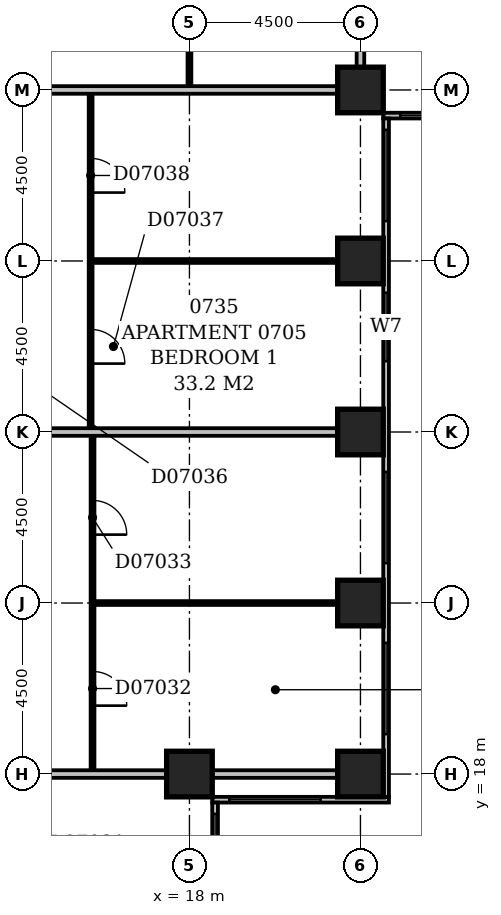
"""IFC4 building model, lengths in metres.
Left out: names, types, materials, properties, quantities, classifications, styles, units other than length and angle.
Written with IfcOpenShell. Run it as: python <this file> out.ifc"""

import sys

from ifc_helpers import new_model, si_unit, direction, frame, frame_2d, origin, origin_2d, place, context, subcontext, project, spatial, rectangle, extrude, element, fill, save


model = new_model("IFC4")
c1 = context("Model", 3, precision=1e-05, world=origin(), true_north=direction((0.0, 1.0)))
c2 = subcontext(c1, "Body", "Model", "MODEL_VIEW")
j1 = project(units=[si_unit("LENGTHUNIT", "METRE"), si_unit("PLANEANGLEUNIT", "RADIAN")], contexts=[c1])
p1 = place(None, origin())
s1 = spatial("IfcSite", under=j1, at=p1, CompositionType="ELEMENT")
p2 = place(p1, origin())
s2 = spatial("IfcBuilding", under=s1, at=p2, CompositionType="ELEMENT")
p3 = place(p2, frame((0.0, 0.0, 36.2)))
s3 = spatial("IfcBuildingStorey", under=s2, at=p3, CompositionType="ELEMENT", Elevation=36.2)
for number, where, z_axis, x_axis in (
    (1, (18.0, 18.0, -0.3), (0.0, 0.0, 1.0), (1.0, 0.0, 0.0)),
    (2, (22.5, 18.0, -0.3), (0.0, 0.0, 1.0), (1.0, 0.0, 0.0)),
    (3, (22.5, 22.5, -0.3), (0.0, 0.0, 1.0), (1.0, 0.0, 0.0)),
    (4, (22.5, 27.0, -0.3), (0.0, 0.0, 1.0), (1.0, 0.0, 0.0)),
    (5, (22.5, 31.5, -0.3), (0.0, 0.0, 1.0), (1.0, 0.0, 0.0)),
    (6, (22.5, 36.0, -0.3), (0.0, 0.0, 1.0), (1.0, 0.0, 0.0)),
):
    element("IfcColumn", number, at=place(p3, frame(where, z_axis=z_axis, x_axis=x_axis)), inside=s3, PredefinedType="COLUMN", context=c2, shape_type="SweptSolid", body=[
        extrude(rectangle(XDim=1.2, YDim=1.2, at=origin_2d()), origin(), (0.0, 0.0, 1.0), 3.6),
    ])
p4 = place(p3, frame((18.675, 8.4, 0.0), z_axis=(0.0, 0.0, 1.0), x_axis=(0.0, 1.0, 0.0)))
e7 = element("IfcWall", 7, at=p4, inside=s3, PredefinedType="STANDARD", context=c2, shape_type="SweptSolid", body=[
    extrude(rectangle(XDim=8.85, YDim=0.15, at=frame_2d((4.425, 0.0))), origin(), (0.0, 0.0, 1.0), 2.7),
])
p5 = place(p4, frame((1.65, 0.0, 0.6)))
e8 = element("IfcOpeningElement", 8, at=p5, cuts=e7, PredefinedType="OPENING", context=c2, shape_type="SweptSolid", body=[
    extrude(rectangle(XDim=2.4, YDim=1.8, at=frame_2d((1.2, 0.9))), frame((0.0, 0.087, 0.0), z_axis=(0.0, -1.0, 0.0), x_axis=(1.0, 0.0, 0.0)), (0.0, 0.0, 1.0), 0.174),
])
p6 = place(p4, frame((6.15, 0.0, 0.6)))
e9 = element("IfcOpeningElement", 9, at=p6, cuts=e7, PredefinedType="OPENING", context=c2, shape_type="SweptSolid", body=[
    extrude(rectangle(XDim=2.4, YDim=1.8, at=frame_2d((1.2, 0.9))), frame((0.0, 0.087, 0.0), z_axis=(0.0, -1.0, 0.0), x_axis=(1.0, 0.0, 0.0)), (0.0, 0.0, 1.0), 0.174),
])
p7 = place(p3, frame((18.6, 17.325, 0.0), z_axis=(0.0, 0.0, 1.0), x_axis=(1.0, 0.0, 0.0)))
e10 = element("IfcWall", 10, at=p7, inside=s3, PredefinedType="STANDARD", context=c2, shape_type="SweptSolid", body=[
    extrude(rectangle(XDim=4.65, YDim=0.15, at=frame_2d((2.325, 0.0))), origin(), (0.0, 0.0, 1.0), 2.7),
])
p8 = place(p7, frame((0.45, 0.0, 0.6)))
e11 = element("IfcOpeningElement", 11, at=p8, cuts=e10, PredefinedType="OPENING", context=c2, shape_type="SweptSolid", body=[
    extrude(rectangle(XDim=2.4, YDim=1.8, at=frame_2d((1.2, 0.9))), frame((0.0, 0.087, 0.0), z_axis=(0.0, -1.0, 0.0), x_axis=(1.0, 0.0, 0.0)), (0.0, 0.0, 1.0), 0.174),
])
p9 = place(p3, frame((23.175, 17.4, 0.0), z_axis=(0.0, 0.0, 1.0), x_axis=(0.0, 1.0, 0.0)))
e12 = element("IfcWall", 12, at=p9, inside=s3, PredefinedType="STANDARD", context=c2, shape_type="SweptSolid", body=[
    extrude(rectangle(XDim=17.85, YDim=0.15, at=frame_2d((8.925, 0.0))), origin(), (0.0, 0.0, 1.0), 2.7),
])
p10 = place(p9, frame((1.65, 0.0, 0.6)))
e13 = element("IfcOpeningElement", 13, at=p10, cuts=e12, PredefinedType="OPENING", context=c2, shape_type="SweptSolid", body=[
    extrude(rectangle(XDim=2.4, YDim=1.8, at=frame_2d((1.2, 0.9))), frame((0.0, 0.087, 0.0), z_axis=(0.0, -1.0, 0.0), x_axis=(1.0, 0.0, 0.0)), (0.0, 0.0, 1.0), 0.174),
])
p11 = place(p9, frame((6.15, 0.0, 0.6)))
e14 = element("IfcOpeningElement", 14, at=p11, cuts=e12, PredefinedType="OPENING", context=c2, shape_type="SweptSolid", body=[
    extrude(rectangle(XDim=2.4, YDim=1.8, at=frame_2d((1.2, 0.9))), frame((0.0, 0.087, 0.0), z_axis=(0.0, -1.0, 0.0), x_axis=(1.0, 0.0, 0.0)), (0.0, 0.0, 1.0), 0.174),
])
p12 = place(p9, frame((11.465, 0.0, 0.6)))
e15 = element("IfcOpeningElement", 15, at=p12, cuts=e12, PredefinedType="OPENING", context=c2, shape_type="SweptSolid", body=[
    extrude(rectangle(XDim=1.8, YDim=1.8, at=frame_2d((0.9, 0.9))), frame((0.0, 0.087, 0.0), z_axis=(0.0, -1.0, 0.0), x_axis=(1.0, 0.0, 0.0)), (0.0, 0.0, 1.0), 0.174),
])
p13 = place(p9, frame((15.15, 0.0, 0.6)))
e16 = element("IfcOpeningElement", 16, at=p13, cuts=e12, PredefinedType="OPENING", context=c2, shape_type="SweptSolid", body=[
    extrude(rectangle(XDim=2.4, YDim=1.8, at=frame_2d((1.2, 0.9))), frame((0.0, 0.087, 0.0), z_axis=(0.0, -1.0, 0.0), x_axis=(1.0, 0.0, 0.0)), (0.0, 0.0, 1.0), 0.174),
])
p14 = place(p3, frame((23.1, 35.325, 0.0), z_axis=(0.0, 0.0, 1.0), x_axis=(1.0, 0.0, 0.0)))
e17 = element("IfcWall", 17, at=p14, inside=s3, PredefinedType="STANDARD", context=c2, shape_type="SweptSolid", body=[
    extrude(rectangle(XDim=45.15, YDim=0.15, at=frame_2d((22.575, 0.0))), origin(), (0.0, 0.0, 1.0), 2.7),
])
p15 = place(p14, frame((0.45, 0.0, 0.6)))
e18 = element("IfcOpeningElement", 18, at=p15, cuts=e17, PredefinedType="OPENING", context=c2, shape_type="SweptSolid", body=[
    extrude(rectangle(XDim=2.4, YDim=1.8, at=frame_2d((1.2, 0.9))), frame((0.0, 0.087, 0.0), z_axis=(0.0, -1.0, 0.0), x_axis=(1.0, 0.0, 0.0)), (0.0, 0.0, 1.0), 0.174),
])
p16 = place(p14, frame((4.776, 0.0, 0.6)))
e19 = element("IfcOpeningElement", 19, at=p16, cuts=e17, PredefinedType="OPENING", context=c2, shape_type="SweptSolid", body=[
    extrude(rectangle(XDim=1.8, YDim=1.8, at=frame_2d((0.9, 0.9))), frame((0.0, 0.087, 0.0), z_axis=(0.0, -1.0, 0.0), x_axis=(1.0, 0.0, 0.0)), (0.0, 0.0, 1.0), 0.174),
])
p17 = place(p14, frame((9.45, 0.0, 0.6)))
e20 = element("IfcOpeningElement", 20, at=p17, cuts=e17, PredefinedType="OPENING", context=c2, shape_type="SweptSolid", body=[
    extrude(rectangle(XDim=2.4, YDim=1.8, at=frame_2d((1.2, 0.9))), frame((0.0, 0.087, 0.0), z_axis=(0.0, -1.0, 0.0), x_axis=(1.0, 0.0, 0.0)), (0.0, 0.0, 1.0), 0.174),
])
p18 = place(p14, frame((13.95, 0.0, 0.6)))
e21 = element("IfcOpeningElement", 21, at=p18, cuts=e17, PredefinedType="OPENING", context=c2, shape_type="SweptSolid", body=[
    extrude(rectangle(XDim=2.4, YDim=1.8, at=frame_2d((1.2, 0.9))), frame((0.0, 0.087, 0.0), z_axis=(0.0, -1.0, 0.0), x_axis=(1.0, 0.0, 0.0)), (0.0, 0.0, 1.0), 0.174),
])
p19 = place(p14, frame((19.777, 0.0, 0.6)))
e22 = element("IfcOpeningElement", 22, at=p19, cuts=e17, PredefinedType="OPENING", context=c2, shape_type="SweptSolid", body=[
    extrude(rectangle(XDim=1.2, YDim=1.8, at=frame_2d((0.6, 0.9))), frame((0.0, 0.087, 0.0), z_axis=(0.0, -1.0, 0.0), x_axis=(1.0, 0.0, 0.0)), (0.0, 0.0, 1.0), 0.174),
])
p20 = place(p14, frame((22.95, 0.0, 0.6)))
e23 = element("IfcOpeningElement", 23, at=p20, cuts=e17, PredefinedType="OPENING", context=c2, shape_type="SweptSolid", body=[
    extrude(rectangle(XDim=2.4, YDim=1.8, at=frame_2d((1.2, 0.9))), frame((0.0, 0.087, 0.0), z_axis=(0.0, -1.0, 0.0), x_axis=(1.0, 0.0, 0.0)), (0.0, 0.0, 1.0), 0.174),
])
p21 = place(p14, frame((27.45, 0.0, 0.6)))
e24 = element("IfcOpeningElement", 24, at=p21, cuts=e17, PredefinedType="OPENING", context=c2, shape_type="SweptSolid", body=[
    extrude(rectangle(XDim=2.4, YDim=1.8, at=frame_2d((1.2, 0.9))), frame((0.0, 0.087, 0.0), z_axis=(0.0, -1.0, 0.0), x_axis=(1.0, 0.0, 0.0)), (0.0, 0.0, 1.0), 0.174),
])
p22 = place(p14, frame((31.95, 0.0, 0.6)))
e25 = element("IfcOpeningElement", 25, at=p22, cuts=e17, PredefinedType="OPENING", context=c2, shape_type="SweptSolid", body=[
    extrude(rectangle(XDim=2.4, YDim=1.8, at=frame_2d((1.2, 0.9))), frame((0.0, 0.087, 0.0), z_axis=(0.0, -1.0, 0.0), x_axis=(1.0, 0.0, 0.0)), (0.0, 0.0, 1.0), 0.174),
])
p23 = place(p14, frame((37.894, 0.0, 0.6)))
e26 = element("IfcOpeningElement", 26, at=p23, cuts=e17, PredefinedType="OPENING", context=c2, shape_type="SweptSolid", body=[
    extrude(rectangle(XDim=1.2, YDim=1.8, at=frame_2d((0.6, 0.9))), frame((0.0, 0.087, 0.0), z_axis=(0.0, -1.0, 0.0), x_axis=(1.0, 0.0, 0.0)), (0.0, 0.0, 1.0), 0.174),
])
p24 = place(p14, frame((40.95, 0.0, 0.6)))
e27 = element("IfcOpeningElement", 27, at=p24, cuts=e17, PredefinedType="OPENING", context=c2, shape_type="SweptSolid", body=[
    extrude(rectangle(XDim=2.4, YDim=1.8, at=frame_2d((1.2, 0.9))), frame((0.0, 0.087, 0.0), z_axis=(0.0, -1.0, 0.0), x_axis=(1.0, 0.0, 0.0)), (0.0, 0.0, 1.0), 0.174),
])
p25 = place(p3, frame((9.1, 18.0, 0.0), z_axis=(0.0, 0.0, 1.0), x_axis=(1.0, 0.0, 0.0)))
e28 = element("IfcWall", 28, at=p25, inside=s3, PredefinedType="PARTITIONING", context=c2, shape_type="SweptSolid", body=[
    extrude(rectangle(XDim=8.3, YDim=0.2, at=frame_2d((4.15, 0.0))), origin(), (0.0, 0.0, 1.0), 2.6),
])
p26 = place(p3, frame((18.6, 18.0, 0.0), z_axis=(0.0, 0.0, 1.0), x_axis=(1.0, 0.0, 0.0)))
e29 = element("IfcWall", 29, at=p26, inside=s3, PredefinedType="PARTITIONING", context=c2, shape_type="SweptSolid", body=[
    extrude(rectangle(XDim=3.3, YDim=0.2, at=frame_2d((1.65, 0.0))), origin(), (0.0, 0.0, 1.0), 2.7),
])
p27 = place(p3, frame((15.45, 18.1, 0.0), z_axis=(0.0, 0.0, 1.0), x_axis=(0.0, 1.0, 0.0)))
e30 = element("IfcWall", 30, at=p27, inside=s3, PredefinedType="PARTITIONING", context=c2, shape_type="SweptSolid", body=[
    extrude(rectangle(XDim=8.8, YDim=0.1, at=frame_2d((4.4, 0.0))), origin(), (0.0, 0.0, 1.0), 3.3),
])
p28 = place(p27, frame((1.7, 0.0, 0.0)))
e31 = element("IfcOpeningElement", 31, at=p28, cuts=e30, PredefinedType="OPENING", context=c2, shape_type="SweptSolid", body=[
    extrude(rectangle(XDim=0.9, YDim=2.1, at=frame_2d((0.45, 1.05))), frame((0.0, 0.062, 0.0), z_axis=(0.0, -1.0, 0.0), x_axis=(1.0, 0.0, 0.0)), (0.0, 0.0, 1.0), 0.124),
])
p29 = place(p27, frame((6.2, 0.0, 0.0)))
e32 = element("IfcOpeningElement", 32, at=p29, cuts=e30, PredefinedType="OPENING", context=c2, shape_type="SweptSolid", body=[
    extrude(rectangle(XDim=0.9, YDim=2.1, at=frame_2d((0.45, 1.05))), frame((0.0, 0.062, 0.0), z_axis=(0.0, -1.0, 0.0), x_axis=(1.0, 0.0, 0.0)), (0.0, 0.0, 1.0), 0.124),
])
p30 = place(p3, frame((15.5, 22.5, 0.0), z_axis=(0.0, 0.0, 1.0), x_axis=(1.0, 0.0, 0.0)))
e33 = element("IfcWall", 33, at=p30, inside=s3, PredefinedType="PARTITIONING", context=c2, shape_type="SweptSolid", body=[
    extrude(rectangle(XDim=6.4, YDim=0.1, at=frame_2d((3.2, 0.0))), origin(), (0.0, 0.0, 1.0), 3.3),
])
p31 = place(p3, frame((9.1, 27.0, 0.0), z_axis=(0.0, 0.0, 1.0), x_axis=(1.0, 0.0, 0.0)))
e34 = element("IfcWall", 34, at=p31, inside=s3, PredefinedType="PARTITIONING", context=c2, shape_type="SweptSolid", body=[
    extrude(rectangle(XDim=12.8, YDim=0.2, at=frame_2d((6.4, 0.0))), origin(), (0.0, 0.0, 1.0), 2.7),
])
p32 = place(p3, frame((15.4, 27.1, 0.0), z_axis=(0.0, 0.0, 1.0), x_axis=(0.0, 1.0, 0.0)))
e35 = element("IfcWall", 35, at=p32, inside=s3, PredefinedType="PARTITIONING", context=c2, shape_type="SweptSolid", body=[
    extrude(rectangle(XDim=8.8, YDim=0.1, at=frame_2d((4.4, 0.0))), origin(), (0.0, 0.0, 1.0), 3.3),
])
p33 = place(p32, frame((1.7, 0.0, 0.0)))
e36 = element("IfcOpeningElement", 36, at=p33, cuts=e35, PredefinedType="OPENING", context=c2, shape_type="SweptSolid", body=[
    extrude(rectangle(XDim=0.9, YDim=2.1, at=frame_2d((0.45, 1.05))), frame((0.0, 0.062, 0.0), z_axis=(0.0, -1.0, 0.0), x_axis=(1.0, 0.0, 0.0)), (0.0, 0.0, 1.0), 0.124),
])
p34 = place(p32, frame((6.2, 0.0, 0.0)))
e37 = element("IfcOpeningElement", 37, at=p34, cuts=e35, PredefinedType="OPENING", context=c2, shape_type="SweptSolid", body=[
    extrude(rectangle(XDim=0.9, YDim=2.1, at=frame_2d((0.45, 1.05))), frame((0.0, 0.062, 0.0), z_axis=(0.0, -1.0, 0.0), x_axis=(1.0, 0.0, 0.0)), (0.0, 0.0, 1.0), 0.124),
])
p35 = place(p3, frame((15.45, 31.5, 0.0), z_axis=(0.0, 0.0, 1.0), x_axis=(1.0, 0.0, 0.0)))
e38 = element("IfcWall", 38, at=p35, inside=s3, PredefinedType="PARTITIONING", context=c2, shape_type="SweptSolid", body=[
    extrude(rectangle(XDim=6.45, YDim=0.1, at=frame_2d((3.225, 0.0))), origin(), (0.0, 0.0, 1.0), 3.3),
])
p36 = place(p3, frame((9.1, 36.0, 0.0), z_axis=(0.0, 0.0, 1.0), x_axis=(1.0, 0.0, 0.0)))
e39 = element("IfcWall", 39, at=p36, inside=s3, PredefinedType="PARTITIONING", context=c2, shape_type="SweptSolid", body=[
    extrude(rectangle(XDim=12.8, YDim=0.2, at=frame_2d((6.4, 0.0))), origin(), (0.0, 0.0, 1.0), 2.4),
])
p37 = place(p3, frame((18.0, 36.1, 0.0), z_axis=(0.0, 0.0, 1.0), x_axis=(0.0, 1.0, 0.0)))
e40 = element("IfcWall", 40, at=p37, inside=s3, PredefinedType="PARTITIONING", context=c2, shape_type="SweptSolid", body=[
    extrude(rectangle(XDim=13.3, YDim=0.1, at=frame_2d((6.65, 0.0))), origin(), (0.0, 0.0, 1.0), 3.3),
])
p38 = place(p3, frame((22.5, 36.6, 0.0), z_axis=(0.0, 0.0, 1.0), x_axis=(0.0, 1.0, 0.0)))
e41 = element("IfcWall", 41, at=p38, inside=s3, PredefinedType="PARTITIONING", context=c2, shape_type="SweptSolid", body=[
    extrude(rectangle(XDim=12.8, YDim=0.2, at=frame_2d((6.4, 0.0))), origin(), (0.0, 0.0, 1.0), 3.3),
])
p39 = place(p6, origin())
e42 = element("IfcWindow", 42, at=p39, inside=s3, PartitioningType="SINGLE_PANEL", PredefinedType="WINDOW", context=c2, shape_type="SweptSolid", body=[
    extrude(rectangle(XDim=2.4, YDim=1.8, at=frame_2d((1.2, 0.9))), frame((0.0, 0.03, 0.0), z_axis=(0.0, -1.0, 0.0), x_axis=(1.0, 0.0, 0.0)), (0.0, 0.0, 1.0), 0.06),
])
fill(e9, e42)
p40 = place(p8, origin())
e43 = element("IfcWindow", 43, at=p40, inside=s3, PartitioningType="SINGLE_PANEL", PredefinedType="WINDOW", context=c2, shape_type="SweptSolid", body=[
    extrude(rectangle(XDim=2.4, YDim=1.8, at=frame_2d((1.2, 0.9))), frame((0.0, 0.03, 0.0), z_axis=(0.0, -1.0, 0.0), x_axis=(1.0, 0.0, 0.0)), (0.0, 0.0, 1.0), 0.06),
])
fill(e11, e43)
p41 = place(p10, origin())
e44 = element("IfcWindow", 44, at=p41, inside=s3, PartitioningType="SINGLE_PANEL", PredefinedType="WINDOW", context=c2, shape_type="SweptSolid", body=[
    extrude(rectangle(XDim=2.4, YDim=1.8, at=frame_2d((1.2, 0.9))), frame((0.0, 0.03, 0.0), z_axis=(0.0, -1.0, 0.0), x_axis=(1.0, 0.0, 0.0)), (0.0, 0.0, 1.0), 0.06),
])
fill(e13, e44)
p42 = place(p11, origin())
e45 = element("IfcWindow", 45, at=p42, inside=s3, PartitioningType="SINGLE_PANEL", PredefinedType="WINDOW", context=c2, shape_type="SweptSolid", body=[
    extrude(rectangle(XDim=2.4, YDim=1.8, at=frame_2d((1.2, 0.9))), frame((0.0, 0.03, 0.0), z_axis=(0.0, -1.0, 0.0), x_axis=(1.0, 0.0, 0.0)), (0.0, 0.0, 1.0), 0.06),
])
fill(e14, e45)
p43 = place(p12, origin())
e46 = element("IfcWindow", 46, at=p43, inside=s3, PartitioningType="SINGLE_PANEL", PredefinedType="WINDOW", context=c2, shape_type="SweptSolid", body=[
    extrude(rectangle(XDim=1.8, YDim=1.8, at=frame_2d((0.9, 0.9))), frame((0.0, 0.03, 0.0), z_axis=(0.0, -1.0, 0.0), x_axis=(1.0, 0.0, 0.0)), (0.0, 0.0, 1.0), 0.06),
])
fill(e15, e46)
p44 = place(p13, origin())
e47 = element("IfcWindow", 47, at=p44, inside=s3, PartitioningType="SINGLE_PANEL", PredefinedType="WINDOW", context=c2, shape_type="SweptSolid", body=[
    extrude(rectangle(XDim=2.4, YDim=1.8, at=frame_2d((1.2, 0.9))), frame((0.0, 0.03, 0.0), z_axis=(0.0, -1.0, 0.0), x_axis=(1.0, 0.0, 0.0)), (0.0, 0.0, 1.0), 0.06),
])
fill(e16, e47)
p45 = place(p15, origin())
e48 = element("IfcWindow", 48, at=p45, inside=s3, PartitioningType="SINGLE_PANEL", PredefinedType="WINDOW", context=c2, shape_type="SweptSolid", body=[
    extrude(rectangle(XDim=2.4, YDim=1.8, at=frame_2d((1.2, 0.9))), frame((0.0, 0.03, 0.0), z_axis=(0.0, -1.0, 0.0), x_axis=(1.0, 0.0, 0.0)), (0.0, 0.0, 1.0), 0.06),
])
fill(e18, e48)
p46 = place(p28, frame((0.9, 0.0, 0.0), z_axis=(0.0, 0.0, 1.0), x_axis=(-1.0, 0.0, 0.0)))
e49 = element("IfcDoor", 49, at=p46, inside=s3, OperationType="SINGLE_SWING_RIGHT", PredefinedType="DOOR", context=c2, shape_type="SweptSolid", body=[
    extrude(rectangle(XDim=0.9, YDim=2.1, at=frame_2d((0.45, 1.05))), frame((0.0, 0.025, 0.0), z_axis=(0.0, -1.0, 0.0), x_axis=(1.0, 0.0, 0.0)), (0.0, 0.0, 1.0), 0.05),
])
fill(e31, e49)
p47 = place(p29, frame((0.9, 0.0, 0.0), z_axis=(0.0, 0.0, 1.0), x_axis=(-1.0, 0.0, 0.0)))
e50 = element("IfcDoor", 50, at=p47, inside=s3, OperationType="SINGLE_SWING_RIGHT", PredefinedType="DOOR", context=c2, shape_type="SweptSolid", body=[
    extrude(rectangle(XDim=0.9, YDim=2.1, at=frame_2d((0.45, 1.05))), frame((0.0, 0.025, 0.0), z_axis=(0.0, -1.0, 0.0), x_axis=(1.0, 0.0, 0.0)), (0.0, 0.0, 1.0), 0.05),
])
fill(e32, e50)
p48 = place(p33, frame((0.9, 0.0, 0.0), z_axis=(0.0, 0.0, 1.0), x_axis=(-1.0, 0.0, 0.0)))
e51 = element("IfcDoor", 51, at=p48, inside=s3, OperationType="SINGLE_SWING_RIGHT", PredefinedType="DOOR", context=c2, shape_type="SweptSolid", body=[
    extrude(rectangle(XDim=0.9, YDim=2.1, at=frame_2d((0.45, 1.05))), frame((0.0, 0.025, 0.0), z_axis=(0.0, -1.0, 0.0), x_axis=(1.0, 0.0, 0.0)), (0.0, 0.0, 1.0), 0.05),
])
fill(e36, e51)
p49 = place(p34, frame((0.9, 0.0, 0.0), z_axis=(0.0, 0.0, 1.0), x_axis=(-1.0, 0.0, 0.0)))
e52 = element("IfcDoor", 52, at=p49, inside=s3, OperationType="SINGLE_SWING_RIGHT", PredefinedType="DOOR", context=c2, shape_type="SweptSolid", body=[
    extrude(rectangle(XDim=0.9, YDim=2.1, at=frame_2d((0.45, 1.05))), frame((0.0, 0.025, 0.0), z_axis=(0.0, -1.0, 0.0), x_axis=(1.0, 0.0, 0.0)), (0.0, 0.0, 1.0), 0.05),
])
fill(e37, e52)
save(model, sys.argv[1])
